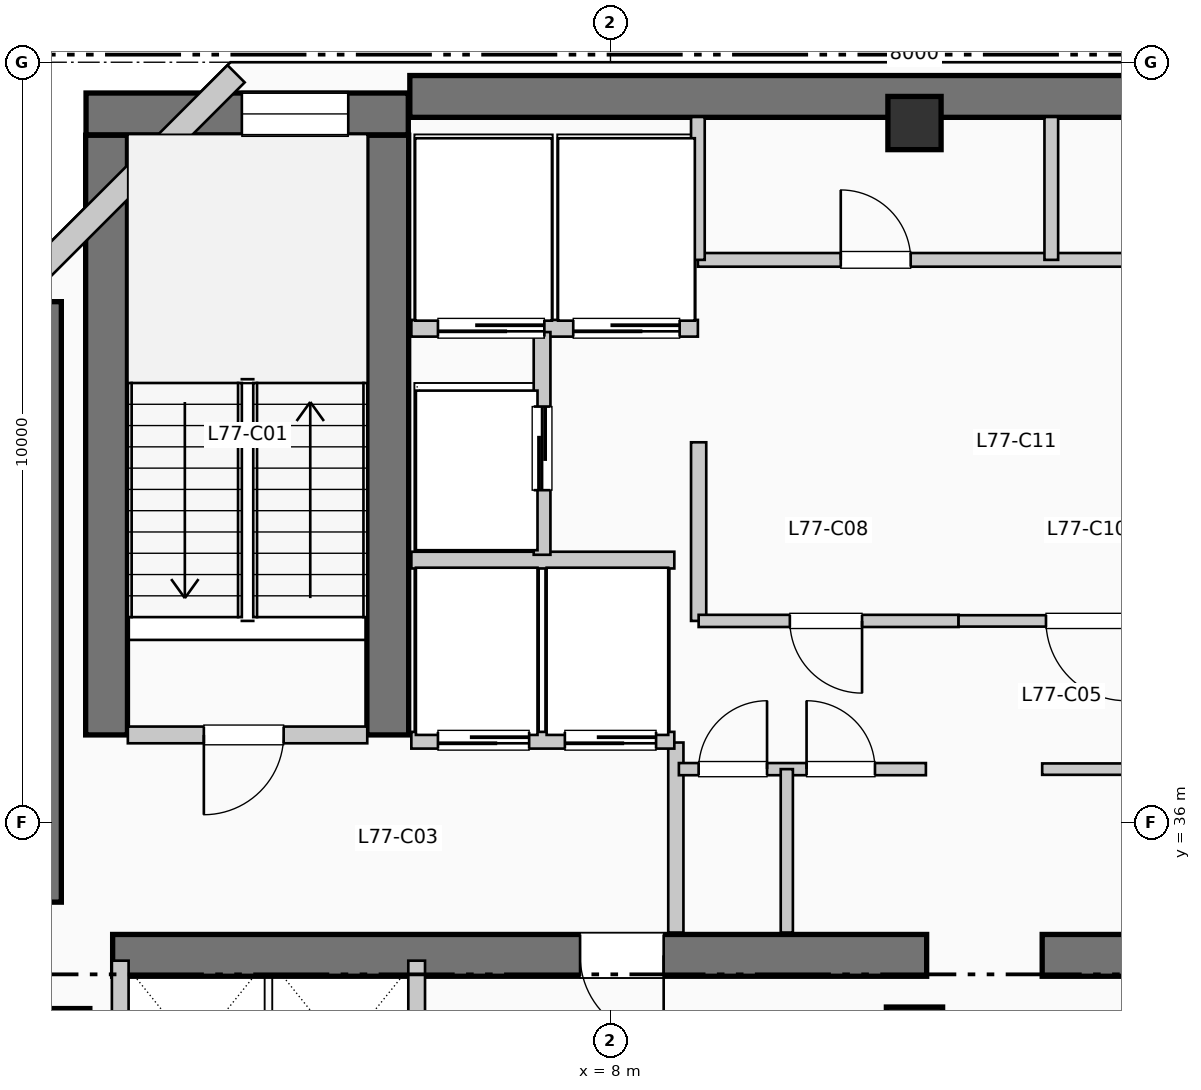
"""IFC4 building model, lengths in metres.
Left out: names, types, materials, properties, quantities, classifications, styles, units other than length and angle.
Written with IfcOpenShell. Run it as: python <this file> out.ifc"""

import sys

from ifc_helpers import new_model, si_unit, direction, frame, frame_2d, origin, origin_2d, place, context, subcontext, project, spatial, rectangle, extrude, element, fill, save


model = new_model("IFC4")
c1 = context("Model", 3, precision=1e-05, world=origin(), true_north=direction((0.0, 1.0)))
c2 = subcontext(c1, "Body", "Model", "MODEL_VIEW")
j1 = project(units=[si_unit("LENGTHUNIT", "METRE"), si_unit("PLANEANGLEUNIT", "RADIAN")], contexts=[c1])
p1 = place(None, origin())
s1 = spatial("IfcSite", under=j1, at=p1, CompositionType="ELEMENT")
p2 = place(p1, origin())
s2 = spatial("IfcBuilding", under=s1, at=p2, CompositionType="ELEMENT")
p3 = place(p2, frame((0.0, 0.0, 315.81)))
s3 = spatial("IfcBuildingStorey", under=s2, at=p3, CompositionType="ELEMENT", Elevation=315.81)
p4 = place(p3, frame((5.36, 45.55, 0.0), z_axis=(0.0, 0.0, 1.0), x_axis=(1.0, 0.0, 0.0)))
e1 = element("IfcWall", 1, at=p4, inside=s3, PredefinedType="SHEAR", context=c2, shape_type="SweptSolid", body=[
    extrude(rectangle(XDim=13.98, YDim=0.55, at=frame_2d((6.99, 0.0))), origin(), (0.0, 0.0, 1.0), 3.96),
])
p5 = place(p3, frame((0.5, 34.95, 0.0), z_axis=(0.0, 0.0, 1.0), x_axis=(0.0, 1.0, 0.0)))
e2 = element("IfcWall", 2, at=p5, inside=s3, PredefinedType="SHEAR", context=c2, shape_type="SweptSolid", body=[
    extrude(rectangle(XDim=7.9, YDim=0.55, at=frame_2d((3.95, 0.0))), origin(), (0.0, 0.0, 1.0), 3.96),
])
p6 = place(p3, frame((1.45, 34.25, 0.0), z_axis=(0.0, 0.0, 1.0), x_axis=(1.0, 0.0, 0.0)))
e3 = element("IfcWall", 3, at=p6, inside=s3, PredefinedType="SHEAR", context=c2, shape_type="SweptSolid", body=[
    extrude(rectangle(XDim=10.71, YDim=0.55, at=frame_2d((5.355, 0.0))), origin(), (0.0, 0.0, 1.0), 3.96),
])
p7 = place(p6, frame((7.25, 0.0, 0.0), z_axis=(0.0, 0.0, 1.0), x_axis=(-1.0, 0.0, 0.0)))
e4 = element("IfcOpeningElement", 4, at=p7, cuts=e3, PredefinedType="OPENING", context=c2, shape_type="SweptSolid", body=[
    extrude(rectangle(XDim=1.1, YDim=2.15, at=frame_2d((0.55, 1.075))), frame((0.0, 0.285, 0.0), z_axis=(0.0, -1.0, 0.0), x_axis=(1.0, 0.0, 0.0)), (0.0, 0.0, 1.0), 0.57),
])
p8 = place(p3, frame((13.68, 34.25, 0.0), z_axis=(0.0, 0.0, 1.0), x_axis=(1.0, 0.0, 0.0)))
e5 = element("IfcWall", 5, at=p8, inside=s3, PredefinedType="SHEAR", context=c2, shape_type="SweptSolid", body=[
    extrude(rectangle(XDim=6.12, YDim=0.55, at=frame_2d((3.06, 0.0))), origin(), (0.0, 0.0, 1.0), 3.96),
])
for number, where, z_axis, x_axis in (
    (6, (1.37, 37.15, 0.0), (0.0, 0.0, 1.0), (0.0, 1.0, 0.0)),
    (7, (5.07, 37.15, 0.0), (0.0, 0.0, 1.0), (0.0, 1.0, 0.0)),
):
    element("IfcWall", number, at=place(p3, frame(where, z_axis=z_axis, x_axis=x_axis)), inside=s3, PredefinedType="SHEAR", context=c2, shape_type="SweptSolid", body=[
        extrude(rectangle(XDim=7.89, YDim=0.55, at=frame_2d((3.945, 0.0))), origin(), (0.0, 0.0, 1.0), 3.96),
    ])
p9 = place(p3, frame((1.1, 45.32, 0.0), z_axis=(0.0, 0.0, 1.0), x_axis=(1.0, 0.0, 0.0)))
e8 = element("IfcWall", 8, at=p9, inside=s3, PredefinedType="SHEAR", context=c2, shape_type="SweptSolid", body=[
    extrude(rectangle(XDim=4.24, YDim=0.55, at=frame_2d((2.12, 0.0))), origin(), (0.0, 0.0, 1.0), 3.96),
])
p10 = place(p9, frame((2.05, 0.0, 1.05)))
e9 = element("IfcOpeningElement", 9, at=p10, cuts=e8, PredefinedType="OPENING", context=c2, shape_type="SweptSolid", body=[
    extrude(rectangle(XDim=1.4, YDim=1.8, at=frame_2d((0.7, 0.9))), frame((0.0, 0.285, 0.0), z_axis=(0.0, -1.0, 0.0), x_axis=(1.0, 0.0, 0.0)), (0.0, 0.0, 1.0), 0.57),
])
p11 = place(p3, frame((0.8, 33.2, 0.0), z_axis=(0.0, 0.0, 1.0), x_axis=(1.0, 0.0, 0.0)))
e10 = element("IfcColumn", 10, at=p11, inside=s3, PredefinedType="COLUMN", context=c2, shape_type="SweptSolid", body=[
    extrude(rectangle(XDim=0.7, YDim=0.7, at=origin_2d()), origin(), (0.0, 0.0, 1.0), 3.96),
])
p12 = place(p3, frame((12.0, 33.2, 0.0), z_axis=(0.0, 0.0, 1.0), x_axis=(1.0, 0.0, 0.0)))
e11 = element("IfcColumn", 11, at=p12, inside=s3, PredefinedType="COLUMN", context=c2, shape_type="SweptSolid", body=[
    extrude(rectangle(XDim=0.74, YDim=0.74, at=origin_2d()), origin(), (0.0, 0.0, 1.0), 3.96),
])
p13 = place(p3, frame((12.0, 45.2, 0.0), z_axis=(0.0, 0.0, 1.0), x_axis=(1.0, 0.0, 0.0)))
e12 = element("IfcColumn", 12, at=p13, inside=s3, PredefinedType="COLUMN", context=c2, shape_type="SweptSolid", body=[
    extrude(rectangle(XDim=0.7, YDim=0.7, at=origin_2d()), origin(), (0.0, 0.0, 1.0), 3.96),
])
p14 = place(p3, frame((3.074, 45.848, 0.0), z_axis=(0.0, 0.0, 1.0), x_axis=(-0.707106781187, -0.707106781187, 0.0)))
e13 = element("IfcWall", 13, at=p14, inside=s3, PredefinedType="SOLIDWALL", context=c2, shape_type="SweptSolid", body=[
    extrude(rectangle(XDim=4.133, YDim=0.32, at=frame_2d((2.066, 0.0))), origin(), (0.0, 0.0, 1.0), 3.74),
])
p15 = place(p3, frame((1.65, 37.15, 0.0), z_axis=(0.0, 0.0, 1.0), x_axis=(1.0, 0.0, 0.0)))
e14 = element("IfcWall", 14, at=p15, inside=s3, PredefinedType="PARTITIONING", context=c2, shape_type="SweptSolid", body=[
    extrude(rectangle(XDim=3.15, YDim=0.22, at=frame_2d((1.575, 0.0))), origin(), (0.0, 0.0, 1.0), 3.74),
])
p16 = place(p15, frame((2.05, 0.0, 0.0), z_axis=(0.0, 0.0, 1.0), x_axis=(-1.0, 0.0, 0.0)))
e15 = element("IfcOpeningElement", 15, at=p16, cuts=e14, PredefinedType="OPENING", context=c2, shape_type="SweptSolid", body=[
    extrude(rectangle(XDim=1.05, YDim=2.15, at=frame_2d((0.525, 1.075))), frame((0.0, 0.12, 0.0), z_axis=(0.0, -1.0, 0.0), x_axis=(1.0, 0.0, 0.0)), (0.0, 0.0, 1.0), 0.24),
])
p17 = place(p3, frame((8.86, 34.55, 0.0), z_axis=(0.0, 0.0, 1.0), x_axis=(0.0, 1.0, 0.0)))
e16 = element("IfcWall", 16, at=p17, inside=s3, PredefinedType="PARTITIONING", context=c2, shape_type="SweptSolid", body=[
    extrude(rectangle(XDim=2.5, YDim=0.2, at=frame_2d((1.25, 0.0))), origin(), (0.0, 0.0, 1.0), 3.74),
])
p18 = place(p3, frame((5.38, 37.08, 0.0), z_axis=(0.0, 0.0, 1.0), x_axis=(1.0, 0.0, 0.0)))
e17 = element("IfcWall", 17, at=p18, inside=s3, PredefinedType="PARTITIONING", context=c2, shape_type="SweptSolid", body=[
    extrude(rectangle(XDim=3.46, YDim=0.22, at=frame_2d((1.73, 0.0))), origin(), (0.0, 0.0, 1.0), 3.74),
])
p19 = place(p18, frame((1.55, 0.0, 0.0), z_axis=(0.0, 0.0, 1.0), x_axis=(-1.0, 0.0, 0.0)))
e18 = element("IfcOpeningElement", 18, at=p19, cuts=e17, PredefinedType="OPENING", context=c2, shape_type="SweptSolid", body=[
    extrude(rectangle(XDim=1.2, YDim=2.2, at=frame_2d((0.6, 1.1))), frame((0.0, 0.12, 0.0), z_axis=(0.0, -1.0, 0.0), x_axis=(1.0, 0.0, 0.0)), (0.0, 0.0, 1.0), 0.24),
])
p20 = place(p18, frame((3.22, 0.0, 0.0), z_axis=(0.0, 0.0, 1.0), x_axis=(-1.0, 0.0, 0.0)))
e19 = element("IfcOpeningElement", 19, at=p20, cuts=e17, PredefinedType="OPENING", context=c2, shape_type="SweptSolid", body=[
    extrude(rectangle(XDim=1.2, YDim=2.2, at=frame_2d((0.6, 1.1))), frame((0.0, 0.12, 0.0), z_axis=(0.0, -1.0, 0.0), x_axis=(1.0, 0.0, 0.0)), (0.0, 0.0, 1.0), 0.24),
])
p21 = place(p3, frame((5.38, 39.45, 0.0), z_axis=(0.0, 0.0, 1.0), x_axis=(1.0, 0.0, 0.0)))
e20 = element("IfcWall", 20, at=p21, inside=s3, PredefinedType="PARTITIONING", context=c2, shape_type="SweptSolid", body=[
    extrude(rectangle(XDim=3.46, YDim=0.22, at=frame_2d((1.73, 0.0))), origin(), (0.0, 0.0, 1.0), 3.74),
])
p22 = place(p3, frame((5.38, 42.5, 0.0), z_axis=(0.0, 0.0, 1.0), x_axis=(1.0, 0.0, 0.0)))
e21 = element("IfcWall", 21, at=p22, inside=s3, PredefinedType="PARTITIONING", context=c2, shape_type="SweptSolid", body=[
    extrude(rectangle(XDim=3.77, YDim=0.22, at=frame_2d((1.885, 0.0))), origin(), (0.0, 0.0, 1.0), 3.74),
])
p23 = place(p22, frame((1.75, 0.0, 0.0), z_axis=(0.0, 0.0, 1.0), x_axis=(-1.0, 0.0, 0.0)))
e22 = element("IfcOpeningElement", 22, at=p23, cuts=e21, PredefinedType="OPENING", context=c2, shape_type="SweptSolid", body=[
    extrude(rectangle(XDim=1.4, YDim=2.2, at=frame_2d((0.7, 1.1))), frame((0.0, 0.12, 0.0), z_axis=(0.0, -1.0, 0.0), x_axis=(1.0, 0.0, 0.0)), (0.0, 0.0, 1.0), 0.24),
])
p24 = place(p22, frame((3.53, 0.0, 0.0), z_axis=(0.0, 0.0, 1.0), x_axis=(-1.0, 0.0, 0.0)))
e23 = element("IfcOpeningElement", 23, at=p24, cuts=e21, PredefinedType="OPENING", context=c2, shape_type="SweptSolid", body=[
    extrude(rectangle(XDim=1.4, YDim=2.2, at=frame_2d((0.7, 1.1))), frame((0.0, 0.12, 0.0), z_axis=(0.0, -1.0, 0.0), x_axis=(1.0, 0.0, 0.0)), (0.0, 0.0, 1.0), 0.24),
])
p25 = place(p3, frame((7.1, 39.52, 0.0), z_axis=(0.0, 0.0, 1.0), x_axis=(0.0, 1.0, 0.0)))
e24 = element("IfcWall", 24, at=p25, inside=s3, PredefinedType="PARTITIONING", context=c2, shape_type="SweptSolid", body=[
    extrude(rectangle(XDim=2.93, YDim=0.22, at=frame_2d((1.465, 0.0))), origin(), (0.0, 0.0, 1.0), 3.74),
])
p26 = place(p25, frame((0.85, 0.0, 0.0)))
e25 = element("IfcOpeningElement", 25, at=p26, cuts=e24, PredefinedType="OPENING", context=c2, shape_type="SweptSolid", body=[
    extrude(rectangle(XDim=1.1, YDim=2.2, at=frame_2d((0.55, 1.1))), frame((0.0, 0.12, 0.0), z_axis=(0.0, -1.0, 0.0), x_axis=(1.0, 0.0, 0.0)), (0.0, 0.0, 1.0), 0.24),
])
for number, where, z_axis, x_axis in (
    (26, (1.55, 31.8, 0.0), (0.0, 0.0, 1.0), (0.0, 1.0, 0.0)),
    (27, (5.45, 31.8, 0.0), (0.0, 0.0, 1.0), (0.0, 1.0, 0.0)),
):
    element("IfcWall", number, at=place(p3, frame(where, z_axis=z_axis, x_axis=x_axis)), inside=s3, PredefinedType="PARTITIONING", context=c2, shape_type="SweptSolid", body=[
        extrude(rectangle(XDim=2.38, YDim=0.22, at=frame_2d((1.19, 0.0))), origin(), (0.0, 0.0, 1.0), 3.74),
    ])
p27 = place(p3, frame((9.16, 38.65, 0.0), z_axis=(0.0, 0.0, 1.0), x_axis=(0.0, 1.0, 0.0)))
e28 = element("IfcWall", 28, at=p27, inside=s3, PredefinedType="PARTITIONING", context=c2, shape_type="SweptSolid", body=[
    extrude(rectangle(XDim=2.35, YDim=0.2, at=frame_2d((1.175, 0.0))), origin(), (0.0, 0.0, 1.0), 3.74),
])
p28 = place(p3, frame((8.9, 36.7, 0.0), z_axis=(0.0, 0.0, 1.0), x_axis=(1.0, 0.0, 0.0)))
e29 = element("IfcWall", 29, at=p28, inside=s3, PredefinedType="PARTITIONING", context=c2, shape_type="SweptSolid", body=[
    extrude(rectangle(XDim=3.25, YDim=0.16, at=frame_2d((1.625, 0.0))), origin(), (0.0, 0.0, 1.0), 3.74),
])
p29 = place(p28, frame((0.26, 0.0, 0.0)))
e30 = element("IfcOpeningElement", 30, at=p29, cuts=e29, PredefinedType="OPENING", context=c2, shape_type="SweptSolid", body=[
    extrude(rectangle(XDim=0.9, YDim=2.15, at=frame_2d((0.45, 1.075))), frame((0.0, 0.09, 0.0), z_axis=(0.0, -1.0, 0.0), x_axis=(1.0, 0.0, 0.0)), (0.0, 0.0, 1.0), 0.18),
])
p30 = place(p28, frame((1.68, 0.0, 0.0)))
e31 = element("IfcOpeningElement", 31, at=p30, cuts=e29, PredefinedType="OPENING", context=c2, shape_type="SweptSolid", body=[
    extrude(rectangle(XDim=0.9, YDim=2.15, at=frame_2d((0.45, 1.075))), frame((0.0, 0.09, 0.0), z_axis=(0.0, -1.0, 0.0), x_axis=(1.0, 0.0, 0.0)), (0.0, 0.0, 1.0), 0.18),
])
p31 = place(p3, frame((10.32, 34.55, 0.0), z_axis=(0.0, 0.0, 1.0), x_axis=(0.0, 1.0, 0.0)))
e32 = element("IfcWall", 32, at=p31, inside=s3, PredefinedType="PARTITIONING", context=c2, shape_type="SweptSolid", body=[
    extrude(rectangle(XDim=2.15, YDim=0.16, at=frame_2d((1.075, 0.0))), origin(), (0.0, 0.0, 1.0), 3.74),
])
p32 = place(p3, frame((9.16, 38.65, 0.0), z_axis=(0.0, 0.0, 1.0), x_axis=(1.0, 0.0, 0.0)))
e33 = element("IfcWall", 33, at=p32, inside=s3, PredefinedType="PARTITIONING", context=c2, shape_type="SweptSolid", body=[
    extrude(rectangle(XDim=3.42, YDim=0.16, at=frame_2d((1.71, 0.0))), origin(), (0.0, 0.0, 1.0), 3.74),
])
p33 = place(p32, frame((2.15, 0.0, 0.0), z_axis=(0.0, 0.0, 1.0), x_axis=(-1.0, 0.0, 0.0)))
e34 = element("IfcOpeningElement", 34, at=p33, cuts=e33, PredefinedType="OPENING", context=c2, shape_type="SweptSolid", body=[
    extrude(rectangle(XDim=0.95, YDim=2.15, at=frame_2d((0.475, 1.075))), frame((0.0, 0.09, 0.0), z_axis=(0.0, -1.0, 0.0), x_axis=(1.0, 0.0, 0.0)), (0.0, 0.0, 1.0), 0.18),
])
p34 = place(p3, frame((13.68, 36.7, 0.0), z_axis=(0.0, 0.0, 1.0), x_axis=(1.0, 0.0, 0.0)))
e35 = element("IfcWall", 35, at=p34, inside=s3, PredefinedType="PARTITIONING", context=c2, shape_type="SweptSolid", body=[
    extrude(rectangle(XDim=3.28, YDim=0.15, at=frame_2d((1.64, 0.0))), origin(), (0.0, 0.0, 1.0), 3.74),
])
p35 = place(p34, frame((1.15, 0.0, 0.0)))
e36 = element("IfcOpeningElement", 36, at=p35, cuts=e35, PredefinedType="OPENING", context=c2, shape_type="SweptSolid", body=[
    extrude(rectangle(XDim=0.95, YDim=2.15, at=frame_2d((0.475, 1.075))), frame((0.0, 0.085, 0.0), z_axis=(0.0, -1.0, 0.0), x_axis=(1.0, 0.0, 0.0)), (0.0, 0.0, 1.0), 0.17),
])
p36 = place(p3, frame((12.58, 38.65, 0.0), z_axis=(0.0, 0.0, 1.0), x_axis=(1.0, 0.0, 0.0)))
e37 = element("IfcWall", 37, at=p36, inside=s3, PredefinedType="PARTITIONING", context=c2, shape_type="SweptSolid", body=[
    extrude(rectangle(XDim=3.38, YDim=0.15, at=frame_2d((1.69, 0.0))), origin(), (0.0, 0.0, 1.0), 3.74),
])
p37 = place(p36, frame((2.2, 0.0, 0.0), z_axis=(0.0, 0.0, 1.0), x_axis=(-1.0, 0.0, 0.0)))
e38 = element("IfcOpeningElement", 38, at=p37, cuts=e37, PredefinedType="OPENING", context=c2, shape_type="SweptSolid", body=[
    extrude(rectangle(XDim=1.05, YDim=2.15, at=frame_2d((0.525, 1.075))), frame((0.0, 0.085, 0.0), z_axis=(0.0, -1.0, 0.0), x_axis=(1.0, 0.0, 0.0)), (0.0, 0.0, 1.0), 0.17),
])
p38 = place(p3, frame((9.15, 43.4, 0.0), z_axis=(0.0, 0.0, 1.0), x_axis=(1.0, 0.0, 0.0)))
e39 = element("IfcWall", 39, at=p38, inside=s3, PredefinedType="PLUMBINGWALL", context=c2, shape_type="SweptSolid", body=[
    extrude(rectangle(XDim=9.33, YDim=0.18, at=frame_2d((4.665, 0.0))), origin(), (0.0, 0.0, 1.0), 3.74),
])
p39 = place(p38, frame((1.88, 0.0, 0.0)))
e40 = element("IfcOpeningElement", 40, at=p39, cuts=e39, PredefinedType="OPENING", context=c2, shape_type="SweptSolid", body=[
    extrude(rectangle(XDim=0.92, YDim=2.1, at=frame_2d((0.46, 1.05))), frame((0.0, 0.1, 0.0), z_axis=(0.0, -1.0, 0.0), x_axis=(1.0, 0.0, 0.0)), (0.0, 0.0, 1.0), 0.2),
])
p40 = place(p38, frame((6.515, 0.0, 0.0)))
e41 = element("IfcOpeningElement", 41, at=p40, cuts=e39, PredefinedType="OPENING", context=c2, shape_type="SweptSolid", body=[
    extrude(rectangle(XDim=0.92, YDim=2.1, at=frame_2d((0.46, 1.05))), frame((0.0, 0.1, 0.0), z_axis=(0.0, -1.0, 0.0), x_axis=(1.0, 0.0, 0.0)), (0.0, 0.0, 1.0), 0.2),
])
for number, where, z_axis, x_axis in (
    (42, (9.15, 43.4, 0.0), (0.0, 0.0, 1.0), (0.0, 1.0, 0.0)),
    (43, (13.8, 43.4, 0.0), (0.0, 0.0, 1.0), (0.0, 1.0, 0.0)),
):
    element("IfcWall", number, at=place(p3, frame(where, z_axis=z_axis, x_axis=x_axis)), inside=s3, PredefinedType="PLUMBINGWALL", context=c2, shape_type="SweptSolid", body=[
        extrude(rectangle(XDim=1.88, YDim=0.18, at=frame_2d((0.94, 0.0))), origin(), (0.0, 0.0, 1.0), 3.74),
    ])
p41 = place(p10, origin())
e44 = element("IfcWindow", 44, at=p41, inside=s3, PartitioningType="SINGLE_PANEL", PredefinedType="WINDOW", context=c2, shape_type="SweptSolid", body=[
    extrude(rectangle(XDim=1.4, YDim=1.8, at=frame_2d((0.7, 0.9))), frame((0.0, 0.03, 0.0), z_axis=(0.0, -1.0, 0.0), x_axis=(1.0, 0.0, 0.0)), (0.0, 0.0, 1.0), 0.06),
])
fill(e9, e44)
p42 = place(p16, origin())
e45 = element("IfcDoor", 45, at=p42, inside=s3, OperationType="SINGLE_SWING_LEFT", PredefinedType="DOOR", context=c2, shape_type="SweptSolid", body=[
    extrude(rectangle(XDim=1.05, YDim=2.15, at=frame_2d((0.525, 1.075))), frame((0.0, 0.025, 0.0), z_axis=(0.0, -1.0, 0.0), x_axis=(1.0, 0.0, 0.0)), (0.0, 0.0, 1.0), 0.05),
])
fill(e15, e45)
p43 = place(p7, origin())
e46 = element("IfcDoor", 46, at=p43, inside=s3, OperationType="SINGLE_SWING_RIGHT", PredefinedType="DOOR", context=c2, shape_type="SweptSolid", body=[
    extrude(rectangle(XDim=1.1, YDim=2.15, at=frame_2d((0.55, 1.075))), frame((0.0, 0.025, 0.0), z_axis=(0.0, -1.0, 0.0), x_axis=(1.0, 0.0, 0.0)), (0.0, 0.0, 1.0), 0.05),
])
fill(e4, e46)
p44 = place(p19, origin())
e47 = element("IfcDoor", 47, at=p44, inside=s3, OperationType="SLIDING_TO_RIGHT", PredefinedType="DOOR", context=c2, shape_type="SweptSolid", body=[
    extrude(rectangle(XDim=1.2, YDim=2.2, at=frame_2d((0.6, 1.1))), frame((0.0, 0.025, 0.0), z_axis=(0.0, -1.0, 0.0), x_axis=(1.0, 0.0, 0.0)), (0.0, 0.0, 1.0), 0.05),
])
fill(e18, e47)
p45 = place(p20, origin())
e48 = element("IfcDoor", 48, at=p45, inside=s3, OperationType="SLIDING_TO_RIGHT", PredefinedType="DOOR", context=c2, shape_type="SweptSolid", body=[
    extrude(rectangle(XDim=1.2, YDim=2.2, at=frame_2d((0.6, 1.1))), frame((0.0, 0.025, 0.0), z_axis=(0.0, -1.0, 0.0), x_axis=(1.0, 0.0, 0.0)), (0.0, 0.0, 1.0), 0.05),
])
fill(e19, e48)
p46 = place(p23, origin())
e49 = element("IfcDoor", 49, at=p46, inside=s3, OperationType="SLIDING_TO_LEFT", PredefinedType="DOOR", context=c2, shape_type="SweptSolid", body=[
    extrude(rectangle(XDim=1.4, YDim=2.2, at=frame_2d((0.7, 1.1))), frame((0.0, 0.025, 0.0), z_axis=(0.0, -1.0, 0.0), x_axis=(1.0, 0.0, 0.0)), (0.0, 0.0, 1.0), 0.05),
])
fill(e22, e49)
p47 = place(p24, origin())
e50 = element("IfcDoor", 50, at=p47, inside=s3, OperationType="SLIDING_TO_LEFT", PredefinedType="DOOR", context=c2, shape_type="SweptSolid", body=[
    extrude(rectangle(XDim=1.4, YDim=2.2, at=frame_2d((0.7, 1.1))), frame((0.0, 0.025, 0.0), z_axis=(0.0, -1.0, 0.0), x_axis=(1.0, 0.0, 0.0)), (0.0, 0.0, 1.0), 0.05),
])
fill(e23, e50)
p48 = place(p26, origin())
e51 = element("IfcDoor", 51, at=p48, inside=s3, OperationType="SLIDING_TO_LEFT", PredefinedType="DOOR", context=c2, shape_type="SweptSolid", body=[
    extrude(rectangle(XDim=1.1, YDim=2.2, at=frame_2d((0.55, 1.1))), frame((0.0, 0.025, 0.0), z_axis=(0.0, -1.0, 0.0), x_axis=(1.0, 0.0, 0.0)), (0.0, 0.0, 1.0), 0.05),
])
fill(e25, e51)
p49 = place(p29, origin())
e52 = element("IfcDoor", 52, at=p49, inside=s3, OperationType="SINGLE_SWING_RIGHT", PredefinedType="DOOR", context=c2, shape_type="SweptSolid", body=[
    extrude(rectangle(XDim=0.9, YDim=2.15, at=frame_2d((0.45, 1.075))), frame((0.0, 0.025, 0.0), z_axis=(0.0, -1.0, 0.0), x_axis=(1.0, 0.0, 0.0)), (0.0, 0.0, 1.0), 0.05),
])
fill(e30, e52)
p50 = place(p30, origin())
e53 = element("IfcDoor", 53, at=p50, inside=s3, OperationType="SINGLE_SWING_LEFT", PredefinedType="DOOR", context=c2, shape_type="SweptSolid", body=[
    extrude(rectangle(XDim=0.9, YDim=2.15, at=frame_2d((0.45, 1.075))), frame((0.0, 0.025, 0.0), z_axis=(0.0, -1.0, 0.0), x_axis=(1.0, 0.0, 0.0)), (0.0, 0.0, 1.0), 0.05),
])
fill(e31, e53)
p51 = place(p33, origin())
e54 = element("IfcDoor", 54, at=p51, inside=s3, OperationType="SINGLE_SWING_RIGHT", PredefinedType="DOOR", context=c2, shape_type="SweptSolid", body=[
    extrude(rectangle(XDim=0.95, YDim=2.15, at=frame_2d((0.475, 1.075))), frame((0.0, 0.025, 0.0), z_axis=(0.0, -1.0, 0.0), x_axis=(1.0, 0.0, 0.0)), (0.0, 0.0, 1.0), 0.05),
])
fill(e34, e54)
p52 = place(p37, origin())
e55 = element("IfcDoor", 55, at=p52, inside=s3, OperationType="SINGLE_SWING_RIGHT", PredefinedType="DOOR", context=c2, shape_type="SweptSolid", body=[
    extrude(rectangle(XDim=1.05, YDim=2.15, at=frame_2d((0.525, 1.075))), frame((0.0, 0.025, 0.0), z_axis=(0.0, -1.0, 0.0), x_axis=(1.0, 0.0, 0.0)), (0.0, 0.0, 1.0), 0.05),
])
fill(e38, e55)
p53 = place(p39, origin())
e56 = element("IfcDoor", 56, at=p53, inside=s3, OperationType="SINGLE_SWING_LEFT", PredefinedType="DOOR", context=c2, shape_type="SweptSolid", body=[
    extrude(rectangle(XDim=0.92, YDim=2.1, at=frame_2d((0.46, 1.05))), frame((0.0, 0.025, 0.0), z_axis=(0.0, -1.0, 0.0), x_axis=(1.0, 0.0, 0.0)), (0.0, 0.0, 1.0), 0.05),
])
fill(e40, e56)
save(model, sys.argv[1])
